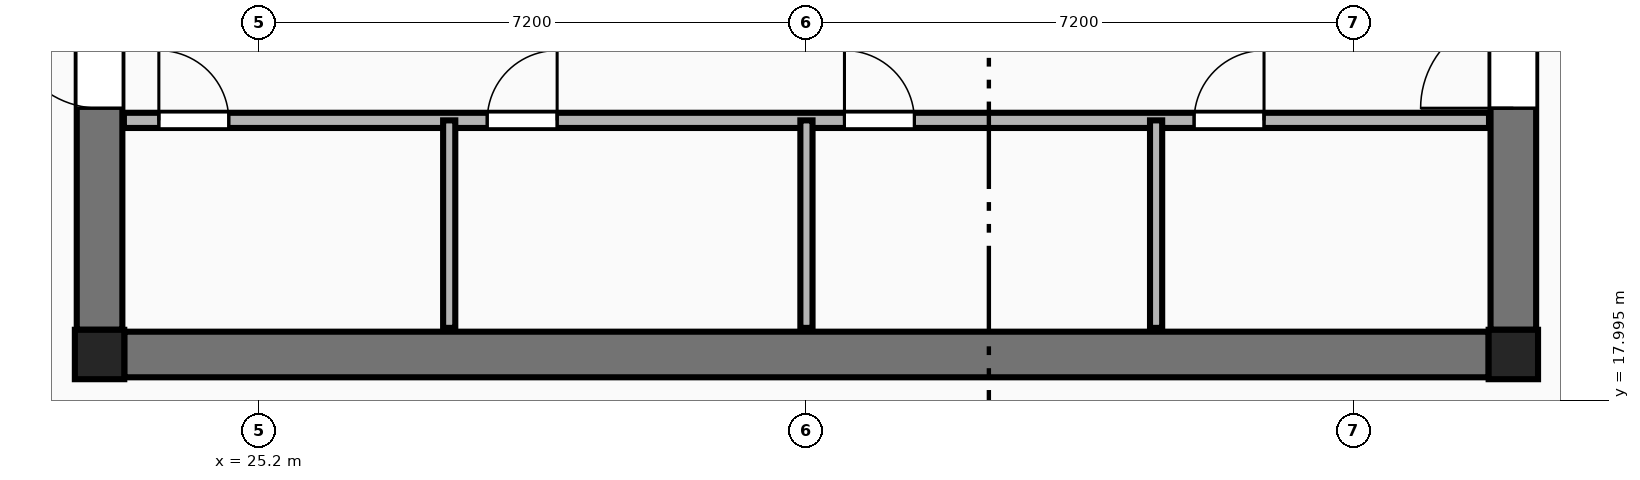
"""IFC4 building model, lengths in metres.
Left out: names, types, materials, properties, quantities, classifications, styles, units other than length and angle.
Written with IfcOpenShell. Run it as: python <this file> out.ifc"""

import sys

from ifc_helpers import new_model, si_unit, direction, frame, frame_2d, origin, origin_2d, place, context, subcontext, project, spatial, rectangle, extrude, element, fill, save


model = new_model("IFC4")
c1 = context("Model", 3, precision=1e-05, world=origin(), true_north=direction((0.0, 1.0)))
c2 = subcontext(c1, "Body", "Model", "MODEL_VIEW")
j1 = project(units=[si_unit("LENGTHUNIT", "METRE"), si_unit("PLANEANGLEUNIT", "RADIAN")], contexts=[c1])
p1 = place(None, origin())
s1 = spatial("IfcSite", under=j1, at=p1, CompositionType="ELEMENT")
p2 = place(p1, origin())
s2 = spatial("IfcBuilding", under=s1, at=p2, CompositionType="ELEMENT")
p3 = place(p2, frame((0.0, 0.0, 200.3)))
s3 = spatial("IfcBuildingStorey", under=s2, at=p3, CompositionType="ELEMENT", Elevation=200.3)
for number, where, z_axis, x_axis in (
    (1, (23.1, 18.6, 0.0), (0.0, 0.0, 1.0), (1.0, 0.0, 0.0)),
    (2, (41.7, 18.6, 0.0), (0.0, 0.0, 1.0), (1.0, 0.0, 0.0)),
):
    element("IfcColumn", number, at=place(p3, frame(where, z_axis=z_axis, x_axis=x_axis)), inside=s3, PredefinedType="COLUMN", context=c2, shape_type="SweptSolid", body=[
        extrude(rectangle(XDim=0.65, YDim=0.65, at=origin_2d()), origin(), (0.0, 0.0, 1.0), 3.55),
    ])
p4 = place(p3, frame((23.425, 18.6, 0.0), z_axis=(0.0, 0.0, 1.0), x_axis=(1.0, 0.0, 0.0)))
e3 = element("IfcWall", 3, at=p4, inside=s3, PredefinedType="SHEAR", context=c2, shape_type="SweptSolid", body=[
    extrude(rectangle(XDim=17.95, YDim=0.6, at=frame_2d((8.975, 0.0))), origin(), (0.0, 0.0, 1.0), 3.35),
])
p5 = place(p3, frame((23.1, 18.925, 0.0), z_axis=(0.0, 0.0, 1.0), x_axis=(0.0, 1.0, 0.0)))
e4 = element("IfcWall", 4, at=p5, inside=s3, PredefinedType="SHEAR", context=c2, shape_type="SweptSolid", body=[
    extrude(rectangle(XDim=13.95, YDim=0.6, at=frame_2d((6.975, 0.0))), origin(), (0.0, 0.0, 1.0), 3.35),
])
p6 = place(p5, frame((2.915, 0.0, 0.0)))
e5 = element("IfcOpeningElement", 5, at=p6, cuts=e4, PredefinedType="OPENING", context=c2, shape_type="SweptSolid", body=[
    extrude(rectangle(XDim=1.22, YDim=2.25, at=frame_2d((0.61, 1.125))), frame((0.0, 0.31, 0.0), z_axis=(0.0, -1.0, 0.0), x_axis=(1.0, 0.0, 0.0)), (0.0, 0.0, 1.0), 0.62),
])
p7 = place(p3, frame((41.7, 18.925, 0.0), z_axis=(0.0, 0.0, 1.0), x_axis=(0.0, 1.0, 0.0)))
e6 = element("IfcWall", 6, at=p7, inside=s3, PredefinedType="SHEAR", context=c2, shape_type="SweptSolid", body=[
    extrude(rectangle(XDim=13.95, YDim=0.6, at=frame_2d((6.975, 0.0))), origin(), (0.0, 0.0, 1.0), 3.35),
])
p8 = place(p7, frame((2.915, 0.0, 0.0)))
e7 = element("IfcOpeningElement", 7, at=p8, cuts=e6, PredefinedType="OPENING", context=c2, shape_type="SweptSolid", body=[
    extrude(rectangle(XDim=1.22, YDim=2.25, at=frame_2d((0.61, 1.125))), frame((0.0, 0.31, 0.0), z_axis=(0.0, -1.0, 0.0), x_axis=(1.0, 0.0, 0.0)), (0.0, 0.0, 1.0), 0.62),
])
p9 = place(p3, frame((23.42, 21.68, 0.0), z_axis=(0.0, 0.0, 1.0), x_axis=(1.0, 0.0, 0.0)))
e8 = element("IfcWall", 8, at=p9, inside=s3, PredefinedType="PLUMBINGWALL", context=c2, shape_type="SweptSolid", body=[
    extrude(rectangle(XDim=17.96, YDim=0.2, at=frame_2d((8.98, 0.0))), origin(), (0.0, 0.0, 1.0), 3.35),
])
p10 = place(p9, frame((0.46, 0.0, 0.0)))
e9 = element("IfcOpeningElement", 9, at=p10, cuts=e8, PredefinedType="OPENING", context=c2, shape_type="SweptSolid", body=[
    extrude(rectangle(XDim=0.92, YDim=2.15, at=frame_2d((0.46, 1.075))), frame((0.0, 0.11, 0.0), z_axis=(0.0, -1.0, 0.0), x_axis=(1.0, 0.0, 0.0)), (0.0, 0.0, 1.0), 0.22),
])
p11 = place(p9, frame((4.78, 0.0, 0.0)))
e10 = element("IfcOpeningElement", 10, at=p11, cuts=e8, PredefinedType="OPENING", context=c2, shape_type="SweptSolid", body=[
    extrude(rectangle(XDim=0.92, YDim=2.15, at=frame_2d((0.46, 1.075))), frame((0.0, 0.11, 0.0), z_axis=(0.0, -1.0, 0.0), x_axis=(1.0, 0.0, 0.0)), (0.0, 0.0, 1.0), 0.22),
])
p12 = place(p9, frame((9.48, 0.0, 0.0)))
e11 = element("IfcOpeningElement", 11, at=p12, cuts=e8, PredefinedType="OPENING", context=c2, shape_type="SweptSolid", body=[
    extrude(rectangle(XDim=0.92, YDim=2.15, at=frame_2d((0.46, 1.075))), frame((0.0, 0.11, 0.0), z_axis=(0.0, -1.0, 0.0), x_axis=(1.0, 0.0, 0.0)), (0.0, 0.0, 1.0), 0.22),
])
p13 = place(p9, frame((14.08, 0.0, 0.0)))
e12 = element("IfcOpeningElement", 12, at=p13, cuts=e8, PredefinedType="OPENING", context=c2, shape_type="SweptSolid", body=[
    extrude(rectangle(XDim=0.92, YDim=2.15, at=frame_2d((0.46, 1.075))), frame((0.0, 0.11, 0.0), z_axis=(0.0, -1.0, 0.0), x_axis=(1.0, 0.0, 0.0)), (0.0, 0.0, 1.0), 0.22),
])
for number, where, z_axis, x_axis in (
    (13, (27.7, 18.95, 0.0), (0.0, 0.0, 1.0), (0.0, 1.0, 0.0)),
    (14, (32.4, 18.95, 0.0), (0.0, 0.0, 1.0), (0.0, 1.0, 0.0)),
    (15, (37.0, 18.95, 0.0), (0.0, 0.0, 1.0), (0.0, 1.0, 0.0)),
):
    element("IfcWall", number, at=place(p3, frame(where, z_axis=z_axis, x_axis=x_axis)), inside=s3, PredefinedType="PARTITIONING", context=c2, shape_type="SweptSolid", body=[
        extrude(rectangle(XDim=2.73, YDim=0.16, at=frame_2d((1.365, 0.0))), origin(), (0.0, 0.0, 1.0), 3.35),
    ])
p14 = place(p6, origin())
e16 = element("IfcDoor", 16, at=p14, inside=s3, OperationType="SINGLE_SWING_RIGHT", PredefinedType="DOOR", context=c2, shape_type="SweptSolid", body=[
    extrude(rectangle(XDim=1.22, YDim=2.25, at=frame_2d((0.61, 1.125))), frame((0.0, 0.025, 0.0), z_axis=(0.0, -1.0, 0.0), x_axis=(1.0, 0.0, 0.0)), (0.0, 0.0, 1.0), 0.05),
])
fill(e5, e16)
p15 = place(p8, origin())
e17 = element("IfcDoor", 17, at=p15, inside=s3, OperationType="SINGLE_SWING_LEFT", PredefinedType="DOOR", context=c2, shape_type="SweptSolid", body=[
    extrude(rectangle(XDim=1.22, YDim=2.25, at=frame_2d((0.61, 1.125))), frame((0.0, 0.025, 0.0), z_axis=(0.0, -1.0, 0.0), x_axis=(1.0, 0.0, 0.0)), (0.0, 0.0, 1.0), 0.05),
])
fill(e7, e17)
p16 = place(p10, origin())
e18 = element("IfcDoor", 18, at=p16, inside=s3, OperationType="SINGLE_SWING_LEFT", PredefinedType="DOOR", context=c2, shape_type="SweptSolid", body=[
    extrude(rectangle(XDim=0.92, YDim=2.15, at=frame_2d((0.46, 1.075))), frame((0.0, 0.025, 0.0), z_axis=(0.0, -1.0, 0.0), x_axis=(1.0, 0.0, 0.0)), (0.0, 0.0, 1.0), 0.05),
])
fill(e9, e18)
p17 = place(p11, origin())
e19 = element("IfcDoor", 19, at=p17, inside=s3, OperationType="SINGLE_SWING_RIGHT", PredefinedType="DOOR", context=c2, shape_type="SweptSolid", body=[
    extrude(rectangle(XDim=0.92, YDim=2.15, at=frame_2d((0.46, 1.075))), frame((0.0, 0.025, 0.0), z_axis=(0.0, -1.0, 0.0), x_axis=(1.0, 0.0, 0.0)), (0.0, 0.0, 1.0), 0.05),
])
fill(e10, e19)
p18 = place(p12, origin())
e20 = element("IfcDoor", 20, at=p18, inside=s3, OperationType="SINGLE_SWING_LEFT", PredefinedType="DOOR", context=c2, shape_type="SweptSolid", body=[
    extrude(rectangle(XDim=0.92, YDim=2.15, at=frame_2d((0.46, 1.075))), frame((0.0, 0.025, 0.0), z_axis=(0.0, -1.0, 0.0), x_axis=(1.0, 0.0, 0.0)), (0.0, 0.0, 1.0), 0.05),
])
fill(e11, e20)
p19 = place(p13, origin())
e21 = element("IfcDoor", 21, at=p19, inside=s3, OperationType="SINGLE_SWING_RIGHT", PredefinedType="DOOR", context=c2, shape_type="SweptSolid", body=[
    extrude(rectangle(XDim=0.92, YDim=2.15, at=frame_2d((0.46, 1.075))), frame((0.0, 0.025, 0.0), z_axis=(0.0, -1.0, 0.0), x_axis=(1.0, 0.0, 0.0)), (0.0, 0.0, 1.0), 0.05),
])
fill(e12, e21)
save(model, sys.argv[1])
